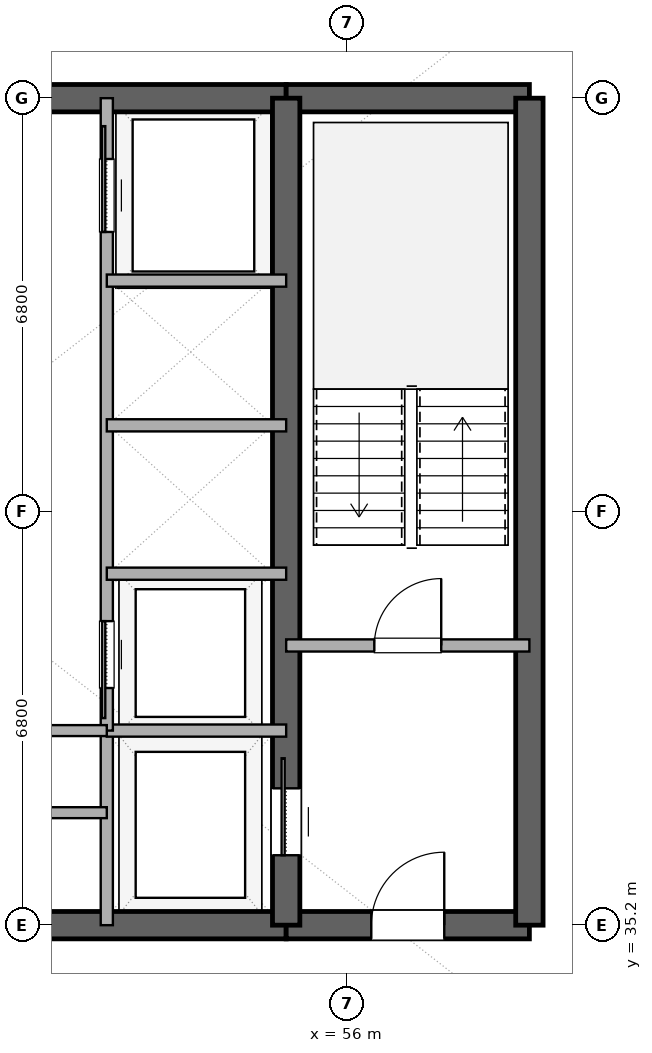
"""IFC4 building model, lengths in metres.
Left out: names, types, materials, properties, quantities, classifications, styles, units other than length and angle.
Written with IfcOpenShell. Run it as: python <this file> out.ifc"""

import sys

from ifc_helpers import new_model, si_unit, direction, frame, frame_2d, origin, place, context, subcontext, project, spatial, rectangle, extrude, element, fill, save


model = new_model("IFC4")
c1 = context("Model", 3, precision=1e-05, world=origin(), true_north=direction((0.0, 1.0)))
c2 = subcontext(c1, "Body", "Model", "MODEL_VIEW")
j1 = project(units=[si_unit("LENGTHUNIT", "METRE"), si_unit("PLANEANGLEUNIT", "RADIAN")], contexts=[c1])
p1 = place(None, origin())
s1 = spatial("IfcSite", under=j1, at=p1, CompositionType="ELEMENT")
p2 = place(p1, origin())
s2 = spatial("IfcBuilding", under=s1, at=p2, CompositionType="ELEMENT")
p3 = place(p2, frame((0.0, 0.0, 193.8)))
s3 = spatial("IfcBuildingStorey", under=s2, at=p3, CompositionType="ELEMENT", Elevation=193.8)
p4 = place(p3, frame((41.0, 35.2, 0.0), z_axis=(0.0, 0.0, 1.0), x_axis=(1.0, 0.0, 0.0)))
e1 = element("IfcWall", 1, at=p4, inside=s3, PredefinedType="SHEAR", context=c2, shape_type="SweptSolid", body=[
    extrude(rectangle(XDim=14.0, YDim=0.45, at=frame_2d((7.0, 0.0))), origin(), (0.0, 0.0, 1.0), 3.38),
])
p5 = place(p4, frame((6.1, 0.0, 0.0)))
e2 = element("IfcOpeningElement", 2, at=p5, cuts=e1, PredefinedType="OPENING", context=c2, shape_type="SweptSolid", body=[
    extrude(rectangle(XDim=1.8, YDim=2.25, at=frame_2d((0.9, 1.125))), frame((0.0, 0.235, 0.0), z_axis=(0.0, -1.0, 0.0), x_axis=(1.0, 0.0, 0.0)), (0.0, 0.0, 1.0), 0.47),
])
p6 = place(p3, frame((55.0, 35.2, 0.0), z_axis=(0.0, 0.0, 1.0), x_axis=(1.0, 0.0, 0.0)))
e3 = element("IfcWall", 3, at=p6, inside=s3, PredefinedType="SHEAR", context=c2, shape_type="SweptSolid", body=[
    extrude(rectangle(XDim=4.0, YDim=0.45, at=frame_2d((2.0, 0.0))), origin(), (0.0, 0.0, 1.0), 3.38),
])
p7 = place(p6, frame((1.4, 0.0, 0.0)))
e4 = element("IfcOpeningElement", 4, at=p7, cuts=e3, PredefinedType="OPENING", context=c2, shape_type="SweptSolid", body=[
    extrude(rectangle(XDim=1.2, YDim=2.15, at=frame_2d((0.6, 1.075))), frame((0.0, 0.235, 0.0), z_axis=(0.0, -1.0, 0.0), x_axis=(1.0, 0.0, 0.0)), (0.0, 0.0, 1.0), 0.47),
])
p8 = place(p3, frame((41.0, 48.8, 0.0), z_axis=(0.0, 0.0, 1.0), x_axis=(1.0, 0.0, 0.0)))
e5 = element("IfcWall", 5, at=p8, inside=s3, PredefinedType="SHEAR", context=c2, shape_type="SweptSolid", body=[
    extrude(rectangle(XDim=14.0, YDim=0.45, at=frame_2d((7.0, 0.0))), origin(), (0.0, 0.0, 1.0), 3.38),
])
p9 = place(p8, frame((6.1, 0.0, 0.0)))
e6 = element("IfcOpeningElement", 6, at=p9, cuts=e5, PredefinedType="OPENING", context=c2, shape_type="SweptSolid", body=[
    extrude(rectangle(XDim=1.8, YDim=2.25, at=frame_2d((0.9, 1.125))), frame((0.0, 0.235, 0.0), z_axis=(0.0, -1.0, 0.0), x_axis=(1.0, 0.0, 0.0)), (0.0, 0.0, 1.0), 0.47),
])
p10 = place(p3, frame((55.0, 48.8, 0.0), z_axis=(0.0, 0.0, 1.0), x_axis=(1.0, 0.0, 0.0)))
e7 = element("IfcWall", 7, at=p10, inside=s3, PredefinedType="SHEAR", context=c2, shape_type="SweptSolid", body=[
    extrude(rectangle(XDim=4.0, YDim=0.45, at=frame_2d((2.0, 0.0))), origin(), (0.0, 0.0, 1.0), 3.38),
])
p11 = place(p3, frame((59.0, 35.2, 0.0), z_axis=(0.0, 0.0, 1.0), x_axis=(0.0, 1.0, 0.0)))
e8 = element("IfcWall", 8, at=p11, inside=s3, PredefinedType="SHEAR", context=c2, shape_type="SweptSolid", body=[
    extrude(rectangle(XDim=13.6, YDim=0.45, at=frame_2d((6.8, 0.0))), origin(), (0.0, 0.0, 1.0), 3.38),
])
p12 = place(p3, frame((55.0, 35.2, 0.0), z_axis=(0.0, 0.0, 1.0), x_axis=(0.0, 1.0, 0.0)))
e9 = element("IfcWall", 9, at=p12, inside=s3, PredefinedType="SHEAR", context=c2, shape_type="SweptSolid", body=[
    extrude(rectangle(XDim=13.6, YDim=0.45, at=frame_2d((6.8, 0.0))), origin(), (0.0, 0.0, 1.0), 3.38),
])
p13 = place(p12, frame((1.15, 0.0, 0.0)))
e10 = element("IfcOpeningElement", 10, at=p13, cuts=e9, PredefinedType="OPENING", context=c2, shape_type="SweptSolid", body=[
    extrude(rectangle(XDim=1.1, YDim=2.2, at=frame_2d((0.55, 1.1))), frame((0.0, 0.235, 0.0), z_axis=(0.0, -1.0, 0.0), x_axis=(1.0, 0.0, 0.0)), (0.0, 0.0, 1.0), 0.47),
])
p14 = place(p3, frame((55.0, 39.8, 0.0), z_axis=(0.0, 0.0, 1.0), x_axis=(1.0, 0.0, 0.0)))
e11 = element("IfcWall", 11, at=p14, inside=s3, PredefinedType="SOLIDWALL", context=c2, shape_type="SweptSolid", body=[
    extrude(rectangle(XDim=4.0, YDim=0.2, at=frame_2d((2.0, 0.0))), origin(), (0.0, 0.0, 1.0), 2.74),
])
p15 = place(p14, frame((1.45, 0.0, 0.0)))
e12 = element("IfcOpeningElement", 12, at=p15, cuts=e11, PredefinedType="OPENING", context=c2, shape_type="SweptSolid", body=[
    extrude(rectangle(XDim=1.1, YDim=2.15, at=frame_2d((0.55, 1.075))), frame((0.0, 0.11, 0.0), z_axis=(0.0, -1.0, 0.0), x_axis=(1.0, 0.0, 0.0)), (0.0, 0.0, 1.0), 0.22),
])
p16 = place(p3, frame((52.05, 35.2, 0.0), z_axis=(0.0, 0.0, 1.0), x_axis=(0.0, 1.0, 0.0)))
e13 = element("IfcWall", 13, at=p16, inside=s3, PredefinedType="SOLIDWALL", context=c2, shape_type="SweptSolid", body=[
    extrude(rectangle(XDim=3.2, YDim=0.2, at=frame_2d((1.6, 0.0))), origin(), (0.0, 0.0, 1.0), 2.74),
])
p17 = place(p3, frame((52.05, 38.4, 0.0), z_axis=(0.0, 0.0, 1.0), x_axis=(1.0, 0.0, 0.0)))
e14 = element("IfcWall", 14, at=p17, inside=s3, PredefinedType="SOLIDWALL", context=c2, shape_type="SweptSolid", body=[
    extrude(rectangle(XDim=2.95, YDim=0.2, at=frame_2d((1.475, 0.0))), origin(), (0.0, 0.0, 1.0), 2.74),
])
p18 = place(p3, frame((52.05, 38.4, 0.0), z_axis=(0.0, 0.0, 1.0), x_axis=(0.0, 1.0, 0.0)))
e15 = element("IfcWall", 15, at=p18, inside=s3, PredefinedType="SOLIDWALL", context=c2, shape_type="SweptSolid", body=[
    extrude(rectangle(XDim=10.4, YDim=0.2, at=frame_2d((5.2, 0.0))), origin(), (0.0, 0.0, 1.0), 2.74),
])
p19 = place(p18, frame((0.7, 0.0, 0.0)))
e16 = element("IfcOpeningElement", 16, at=p19, cuts=e15, PredefinedType="OPENING", context=c2, shape_type="SweptSolid", body=[
    extrude(rectangle(XDim=1.1, YDim=2.2, at=frame_2d((0.55, 1.1))), frame((0.0, 0.11, 0.0), z_axis=(0.0, -1.0, 0.0), x_axis=(1.0, 0.0, 0.0)), (0.0, 0.0, 1.0), 0.22),
])
p20 = place(p18, frame((8.2, 0.0, 0.0)))
e17 = element("IfcOpeningElement", 17, at=p20, cuts=e15, PredefinedType="OPENING", context=c2, shape_type="SweptSolid", body=[
    extrude(rectangle(XDim=1.2, YDim=2.2, at=frame_2d((0.6, 1.1))), frame((0.0, 0.11, 0.0), z_axis=(0.0, -1.0, 0.0), x_axis=(1.0, 0.0, 0.0)), (0.0, 0.0, 1.0), 0.22),
])
for number, where, z_axis, x_axis in (
    (18, (52.05, 40.98, 0.0), (0.0, 0.0, 1.0), (1.0, 0.0, 0.0)),
    (19, (52.05, 43.42, 0.0), (0.0, 0.0, 1.0), (1.0, 0.0, 0.0)),
    (20, (52.05, 45.8, 0.0), (0.0, 0.0, 1.0), (1.0, 0.0, 0.0)),
):
    element("IfcWall", number, at=place(p3, frame(where, z_axis=z_axis, x_axis=x_axis)), inside=s3, PredefinedType="SOLIDWALL", context=c2, shape_type="SweptSolid", body=[
        extrude(rectangle(XDim=2.95, YDim=0.2, at=frame_2d((1.475, 0.0))), origin(), (0.0, 0.0, 1.0), 2.74),
    ])
for number, where, z_axis, x_axis in (
    (21, (49.2, 37.05, 0.0), (0.0, 0.0, 1.0), (1.0, 0.0, 0.0)),
    (22, (49.2, 38.4, 0.0), (0.0, 0.0, 1.0), (1.0, 0.0, 0.0)),
):
    element("IfcWall", number, at=place(p3, frame(where, z_axis=z_axis, x_axis=x_axis)), inside=s3, PredefinedType="PLUMBINGWALL", context=c2, shape_type="SweptSolid", body=[
        extrude(rectangle(XDim=2.85, YDim=0.18, at=frame_2d((1.425, 0.0))), origin(), (0.0, 0.0, 1.0), 2.74),
    ])
p21 = place(p13, origin())
e23 = element("IfcDoor", 23, at=p21, inside=s3, OperationType="SLIDING_TO_RIGHT", PredefinedType="DOOR", context=c2, shape_type="SweptSolid", body=[
    extrude(rectangle(XDim=1.1, YDim=2.2, at=frame_2d((0.55, 1.1))), frame((0.0, 0.025, 0.0), z_axis=(0.0, -1.0, 0.0), x_axis=(1.0, 0.0, 0.0)), (0.0, 0.0, 1.0), 0.05),
])
fill(e10, e23)
p22 = place(p7, origin())
e24 = element("IfcDoor", 24, at=p22, inside=s3, OperationType="SINGLE_SWING_RIGHT", PredefinedType="DOOR", context=c2, shape_type="SweptSolid", body=[
    extrude(rectangle(XDim=1.2, YDim=2.15, at=frame_2d((0.6, 1.075))), frame((0.0, 0.025, 0.0), z_axis=(0.0, -1.0, 0.0), x_axis=(1.0, 0.0, 0.0)), (0.0, 0.0, 1.0), 0.05),
])
fill(e4, e24)
p23 = place(p15, origin())
e25 = element("IfcDoor", 25, at=p23, inside=s3, OperationType="SINGLE_SWING_RIGHT", PredefinedType="DOOR", context=c2, shape_type="SweptSolid", body=[
    extrude(rectangle(XDim=1.1, YDim=2.15, at=frame_2d((0.55, 1.075))), frame((0.0, 0.025, 0.0), z_axis=(0.0, -1.0, 0.0), x_axis=(1.0, 0.0, 0.0)), (0.0, 0.0, 1.0), 0.05),
])
fill(e12, e25)
p24 = place(p19, origin())
e26 = element("IfcDoor", 26, at=p24, inside=s3, OperationType="SLIDING_TO_LEFT", PredefinedType="DOOR", context=c2, shape_type="SweptSolid", body=[
    extrude(rectangle(XDim=1.1, YDim=2.2, at=frame_2d((0.55, 1.1))), frame((0.0, 0.025, 0.0), z_axis=(0.0, -1.0, 0.0), x_axis=(1.0, 0.0, 0.0)), (0.0, 0.0, 1.0), 0.05),
])
fill(e16, e26)
p25 = place(p20, origin())
e27 = element("IfcDoor", 27, at=p25, inside=s3, OperationType="SLIDING_TO_RIGHT", PredefinedType="DOOR", context=c2, shape_type="SweptSolid", body=[
    extrude(rectangle(XDim=1.2, YDim=2.2, at=frame_2d((0.6, 1.1))), frame((0.0, 0.025, 0.0), z_axis=(0.0, -1.0, 0.0), x_axis=(1.0, 0.0, 0.0)), (0.0, 0.0, 1.0), 0.05),
])
fill(e17, e27)
save(model, sys.argv[1])
